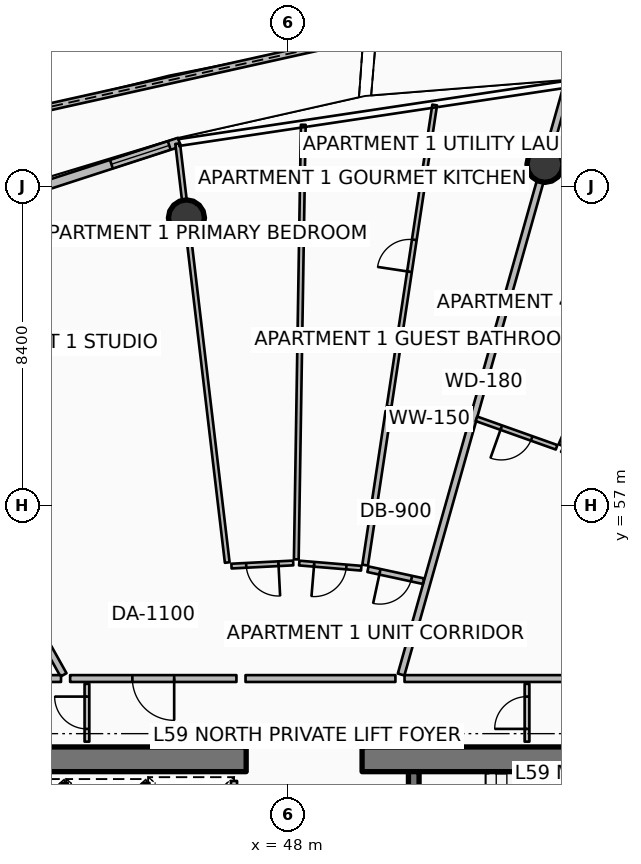
"""IFC4 building model, lengths in metres.
Left out: names, types, materials, properties, quantities, classifications, styles, units other than length and angle.
Written with IfcOpenShell. Run it as: python <this file> out.ifc"""

import sys

from ifc_helpers import new_model, si_unit, direction, frame, frame_2d, origin, origin_2d, place, context, subcontext, project, spatial, polyline, rectangle, circle, outline, extrude, element, fill, save


model = new_model("IFC4")
c1 = context("Model", 3, precision=1e-05, world=origin(), true_north=direction((0.0, 1.0)))
c2 = subcontext(c1, "Body", "Model", "MODEL_VIEW")
j1 = project(units=[si_unit("LENGTHUNIT", "METRE"), si_unit("PLANEANGLEUNIT", "RADIAN")], contexts=[c1])
p1 = place(None, origin())
s1 = spatial("IfcSite", under=j1, at=p1, CompositionType="ELEMENT")
p2 = place(p1, origin())
s2 = spatial("IfcBuilding", under=s1, at=p2, CompositionType="ELEMENT")
p3 = place(p2, frame((0.0, 0.0, 236.7)))
s3 = spatial("IfcBuildingStorey", under=s2, at=p3, CompositionType="ELEMENT", Elevation=236.7)
for number, where, z_axis, x_axis in (
    (1, (37.15, 50.325, 0.0), (0.0, 0.0, 1.0), (1.0, 0.0, 0.0)),
    (2, (49.95, 50.325, 0.0), (0.0, 0.0, 1.0), (1.0, 0.0, 0.0)),
):
    element("IfcWall", number, at=place(p3, frame(where, z_axis=z_axis, x_axis=x_axis)), inside=s3, PredefinedType="SHEAR", context=c2, shape_type="SweptSolid", body=[
        extrude(rectangle(XDim=9.75, YDim=0.65, at=frame_2d((4.875, 0.0))), origin(), (0.0, 0.0, 1.0), 3.85),
    ])
p4 = place(p3, frame((51.31, 46.5, 0.0), z_axis=(0.0, 0.0, 1.0), x_axis=(0.0, 1.0, 0.0)))
e3 = element("IfcWall", 3, at=p4, inside=s3, PredefinedType="SHEAR", context=c2, shape_type="SweptSolid", body=[
    extrude(rectangle(XDim=3.5, YDim=0.28, at=frame_2d((1.75, 0.0))), origin(), (0.0, 0.0, 1.0), 3.85),
])
for number, where, z_axis, x_axis in (
    (4, (54.763, 65.979, 0.0), (0.0, 0.0, 1.0), (1.0, 0.0, 0.0)),
    (5, (45.329, 64.571, 0.0), (0.0, 0.0, 1.0), (1.0, 0.0, 0.0)),
):
    element("IfcColumn", number, at=place(p3, frame(where, z_axis=z_axis, x_axis=x_axis)), inside=s3, PredefinedType="COLUMN", context=c2, shape_type="SweptSolid", body=[
        extrude(circle(Radius=0.475, at=origin_2d()), origin(), (0.0, 0.0, 1.0), 3.59),
    ])
p5 = place(p3, frame((49.983, 69.327, 0.0), z_axis=(0.0, 0.0, 1.0), x_axis=(-0.976130464401, -0.217184982143, 0.0)))
e6 = element("IfcWall", 6, at=p5, inside=s3, PredefinedType="PARAPET", context=c2, shape_type="SweptSolid", body=[
    extrude(outline(polyline([(0.0, 0.0), (10.258, 0.0), (10.257, 1.348), (5.129, 1.182), (0.0, 1.12), (0.0, 0.0)])), frame((0.0, 0.09, 0.0), z_axis=(0.0, -1.0, 0.0), x_axis=(1.0, 0.0, 0.0)), (0.0, 0.0, 1.0), 0.18),
])
p6 = place(p3, frame((45.142, 66.564, 0.0), z_axis=(0.0, 0.0, 1.0), x_axis=(-0.951055974609, -0.309018661507, 0.0)))
e7 = element("IfcWall", 7, at=p6, inside=s3, PredefinedType="SOLIDWALL", context=c2, shape_type="SweptSolid", body=[
    extrude(rectangle(XDim=9.745, YDim=0.24, at=frame_2d((4.873, 0.0))), origin(), (0.0, 0.0, 1.0), 2.54),
])
p7 = place(p6, frame((7.525, 0.0, 0.0)))
e8 = element("IfcOpeningElement", 8, at=p7, cuts=e7, PredefinedType="OPENING", context=c2, shape_type="SweptSolid", body=[
    extrude(rectangle(XDim=1.45, YDim=2.15, at=frame_2d((0.725, 1.075))), frame((0.0, 0.13, 0.0), z_axis=(0.0, -1.0, 0.0), x_axis=(1.0, 0.0, 0.0)), (0.0, 0.0, 1.0), 0.26),
])
p8 = place(p6, frame((0.28, 0.0, 0.65)))
e9 = element("IfcOpeningElement", 9, at=p8, cuts=e7, PredefinedType="OPENING", context=c2, shape_type="SweptSolid", body=[
    extrude(rectangle(XDim=1.6, YDim=1.5, at=frame_2d((0.8, 0.75))), frame((0.0, 0.13, 0.0), z_axis=(0.0, -1.0, 0.0), x_axis=(1.0, 0.0, 0.0)), (0.0, 0.0, 1.0), 0.26),
])
for number, where, z_axis, x_axis in (
    (10, (42.125, 48.095, 0.0), (0.0, 0.0, 1.0), (0.0, 1.0, 0.0)),
    (11, (44.275, 48.095, 0.0), (0.0, 0.0, 1.0), (0.0, 1.0, 0.0)),
):
    element("IfcWall", number, at=place(p3, frame(where, z_axis=z_axis, x_axis=x_axis)), inside=s3, PredefinedType="PARTITIONING", context=c2, shape_type="SweptSolid", body=[
        extrude(rectangle(XDim=1.61, YDim=0.16, at=frame_2d((0.805, 0.0))), origin(), (0.0, 0.0, 1.0), 3.59),
    ])
p9 = place(p3, frame((46.58, 48.045, 0.0), z_axis=(0.0, 0.0, 1.0), x_axis=(0.0, 1.0, 0.0)))
e12 = element("IfcWall", 12, at=p9, inside=s3, PredefinedType="PARTITIONING", context=c2, shape_type="SweptSolid", body=[
    extrude(rectangle(XDim=1.71, YDim=0.16, at=frame_2d((0.855, 0.0))), origin(), (0.0, 0.0, 1.0), 3.59),
])
p10 = place(p3, frame((42.71, 50.79, 0.0), z_axis=(0.0, 0.0, 1.0), x_axis=(0.0, 1.0, 0.0)))
e13 = element("IfcWall", 13, at=p10, inside=s3, PredefinedType="PARTITIONING", context=c2, shape_type="SweptSolid", body=[
    extrude(rectangle(XDim=1.52, YDim=0.125, at=frame_2d((0.76, 0.0))), origin(), (0.0, 0.0, 1.0), 2.957),
])
p11 = place(p10, frame((0.335, 0.0, 0.0)))
e14 = element("IfcOpeningElement", 14, at=p11, cuts=e13, PredefinedType="OPENING", context=c2, shape_type="SweptSolid", body=[
    extrude(rectangle(XDim=0.85, YDim=2.06, at=frame_2d((0.425, 1.03))), frame((0.0, 0.073, 0.0), z_axis=(0.0, -1.0, 0.0), x_axis=(1.0, 0.0, 0.0)), (0.0, 0.0, 1.0), 0.145),
])
p12 = place(p3, frame((54.29, 50.79, 0.0), z_axis=(0.0, 0.0, 1.0), x_axis=(0.0, 1.0, 0.0)))
e15 = element("IfcWall", 15, at=p12, inside=s3, PredefinedType="PARTITIONING", context=c2, shape_type="SweptSolid", body=[
    extrude(rectangle(XDim=1.52, YDim=0.125, at=frame_2d((0.76, 0.0))), origin(), (0.0, 0.0, 1.0), 3.03),
])
p13 = place(p12, frame((0.335, 0.0, 0.0)))
e16 = element("IfcOpeningElement", 16, at=p13, cuts=e15, PredefinedType="OPENING", context=c2, shape_type="SweptSolid", body=[
    extrude(rectangle(XDim=0.85, YDim=2.06, at=frame_2d((0.425, 1.03))), frame((0.0, 0.073, 0.0), z_axis=(0.0, -1.0, 0.0), x_axis=(1.0, 0.0, 0.0)), (0.0, 0.0, 1.0), 0.145),
])
p14 = place(p3, frame((50.977, 52.556, 0.0), z_axis=(0.0, 0.0, 1.0), x_axis=(0.271442063103, 0.962454781472, 0.0)))
e17 = element("IfcWall", 17, at=p14, inside=s3, PredefinedType="PARTITIONING", context=c2, shape_type="SweptSolid", body=[
    extrude(rectangle(XDim=16.017, YDim=0.18, at=frame_2d((8.008, 0.0))), origin(), (0.0, 0.0, 1.0), 2.957),
])
p15 = place(p3, frame((42.094, 52.546, 0.0), z_axis=(0.0, 0.0, 1.0), x_axis=(-0.48862654941, 0.872493034477, 0.0)))
e18 = element("IfcWall", 18, at=p15, inside=s3, PredefinedType="PARTITIONING", context=c2, shape_type="SweptSolid", body=[
    extrude(rectangle(XDim=12.508, YDim=0.18, at=frame_2d((6.254, 0.0))), origin(), (0.0, 0.0, 1.0), 2.957),
])
p16 = place(p3, frame((46.643, 52.45, 0.0), z_axis=(0.0, 0.0, 1.0), x_axis=(-1.0, 0.0, 0.0)))
e19 = element("IfcWall", 19, at=p16, inside=s3, PredefinedType="PARTITIONING", context=c2, shape_type="SweptSolid", body=[
    extrude(rectangle(XDim=4.376, YDim=0.18, at=frame_2d((2.188, 0.0))), origin(), (0.0, 0.0, 1.0), 2.957),
])
p17 = place(p16, frame((1.638, 0.0, 0.0)))
e20 = element("IfcOpeningElement", 20, at=p17, cuts=e19, PredefinedType="OPENING", context=c2, shape_type="SweptSolid", body=[
    extrude(rectangle(XDim=1.1, YDim=2.1, at=frame_2d((0.55, 1.05))), frame((0.0, 0.1, 0.0), z_axis=(0.0, -1.0, 0.0), x_axis=(1.0, 0.0, 0.0)), (0.0, 0.0, 1.0), 0.2),
])
p18 = place(p3, frame((50.827, 52.45, 0.0), z_axis=(0.0, 0.0, 1.0), x_axis=(-1.0, 0.0, 0.0)))
e21 = element("IfcWall", 21, at=p18, inside=s3, PredefinedType="PARTITIONING", context=c2, shape_type="SweptSolid", body=[
    extrude(rectangle(XDim=3.944, YDim=0.18, at=frame_2d((1.972, 0.0))), origin(), (0.0, 0.0, 1.0), 2.957),
])
p19 = place(p3, frame((46.402, 55.503, 0.0), z_axis=(0.0, 0.0, 1.0), x_axis=(-0.117541965763, 0.99306791625, 0.0)))
e22 = element("IfcWall", 22, at=p19, inside=s3, PredefinedType="PARTITIONING", context=c2, shape_type="SweptSolid", body=[
    extrude(rectangle(XDim=11.098, YDim=0.125, at=frame_2d((5.549, 0.0))), origin(), (0.0, 0.0, 1.0), 2.957),
])
p20 = place(p3, frame((51.566, 55.011, 0.0), z_axis=(0.0, 0.0, 1.0), x_axis=(-0.977543483976, 0.21073380587, 0.0)))
e23 = element("IfcWall", 23, at=p20, inside=s3, PredefinedType="PARTITIONING", context=c2, shape_type="SweptSolid", body=[
    extrude(rectangle(XDim=1.494, YDim=0.15, at=frame_2d((0.747, 0.0))), origin(), (0.0, 0.0, 1.0), 2.957),
])
p21 = place(p20, frame((0.322, 0.0, 0.0)))
e24 = element("IfcOpeningElement", 24, at=p21, cuts=e23, PredefinedType="OPENING", context=c2, shape_type="SweptSolid", body=[
    extrude(rectangle(XDim=0.85, YDim=2.06, at=frame_2d((0.425, 1.03))), frame((0.0, 0.085, 0.0), z_axis=(0.0, -1.0, 0.0), x_axis=(1.0, 0.0, 0.0)), (0.0, 0.0, 1.0), 0.17),
])
p22 = place(p3, frame((52.711, 59.073, 0.0), z_axis=(0.0, 0.0, 1.0), x_axis=(-0.977523973404, 0.210824290395, 0.0)))
e25 = element("IfcWall", 25, at=p22, inside=s3, PredefinedType="PARTITIONING", context=c2, shape_type="SweptSolid", body=[
    extrude(rectangle(XDim=2.021, YDim=0.15, at=frame_2d((1.01, 0.0))), origin(), (0.0, 0.0, 1.0), 2.957),
])
p23 = place(p3, frame((50.031, 55.434, 0.0), z_axis=(0.0, 0.0, 1.0), x_axis=(0.149464107942, 0.988767151779, 0.0)))
e26 = element("IfcWall", 26, at=p23, inside=s3, PredefinedType="PARTITIONING", context=c2, shape_type="SweptSolid", body=[
    extrude(rectangle(XDim=4.09, YDim=0.15, at=frame_2d((2.045, 0.0))), origin(), (0.0, 0.0, 1.0), 3.03),
])
p24 = place(p3, frame((50.661, 59.607, 0.0), z_axis=(0.0, 0.0, 1.0), x_axis=(0.149441267911, 0.988770604056, 0.0)))
e27 = element("IfcWall", 27, at=p24, inside=s3, PredefinedType="PARTITIONING", context=c2, shape_type="SweptSolid", body=[
    extrude(rectangle(XDim=8.025, YDim=0.125, at=frame_2d((4.012, 0.0))), origin(), (0.0, 0.0, 1.0), 3.03),
])
p25 = place(p24, frame((3.587, 0.0, 0.0)))
e28 = element("IfcOpeningElement", 28, at=p25, cuts=e27, PredefinedType="OPENING", context=c2, shape_type="SweptSolid", body=[
    extrude(rectangle(XDim=0.85, YDim=2.06, at=frame_2d((0.425, 1.03))), frame((0.0, 0.073, 0.0), z_axis=(0.0, -1.0, 0.0), x_axis=(1.0, 0.0, 0.0)), (0.0, 0.0, 1.0), 0.145),
])
p26 = place(p3, frame((48.219, 55.585, 0.0), z_axis=(0.0, 0.0, 1.0), x_axis=(0.016095267484, 0.999870462792, 0.0)))
e29 = element("IfcWall", 29, at=p26, inside=s3, PredefinedType="PARTITIONING", context=c2, shape_type="SweptSolid", body=[
    extrude(rectangle(XDim=11.437, YDim=0.125, at=frame_2d((5.719, 0.0))), origin(), (0.0, 0.0, 1.0), 3.03),
])
p27 = place(p3, frame((49.927, 55.353, 0.0), z_axis=(0.0, 0.0, 1.0), x_axis=(-0.996539580569, 0.083119578673, 0.0)))
e30 = element("IfcWall", 30, at=p27, inside=s3, PredefinedType="PARTITIONING", context=c2, shape_type="SweptSolid", body=[
    extrude(rectangle(XDim=1.636, YDim=0.125, at=frame_2d((0.818, 0.0))), origin(), (0.0, 0.0, 1.0), 3.03),
])
p28 = place(p27, frame((0.393, 0.0, 0.0)))
e31 = element("IfcOpeningElement", 31, at=p28, cuts=e30, PredefinedType="OPENING", context=c2, shape_type="SweptSolid", body=[
    extrude(rectangle(XDim=0.85, YDim=2.06, at=frame_2d((0.425, 1.03))), frame((0.0, 0.073, 0.0), z_axis=(0.0, -1.0, 0.0), x_axis=(1.0, 0.0, 0.0)), (0.0, 0.0, 1.0), 0.145),
])
p29 = place(p3, frame((48.137, 55.491, 0.0), z_axis=(0.0, 0.0, 1.0), x_axis=(-0.998703955292, -0.050896067475, 0.0)))
e32 = element("IfcWall", 32, at=p29, inside=s3, PredefinedType="PARTITIONING", context=c2, shape_type="SweptSolid", body=[
    extrude(rectangle(XDim=1.626, YDim=0.125, at=frame_2d((0.813, 0.0))), origin(), (0.0, 0.0, 1.0), 3.03),
])
p30 = place(p29, frame((0.388, 0.0, 0.0)))
e33 = element("IfcOpeningElement", 33, at=p30, cuts=e32, PredefinedType="OPENING", context=c2, shape_type="SweptSolid", body=[
    extrude(rectangle(XDim=0.85, YDim=2.06, at=frame_2d((0.425, 1.03))), frame((0.0, 0.073, 0.0), z_axis=(0.0, -1.0, 0.0), x_axis=(1.0, 0.0, 0.0)), (0.0, 0.0, 1.0), 0.145),
])
p31 = place(p3, frame((42.028, 52.45, 0.0), z_axis=(0.0, 0.0, 1.0), x_axis=(-1.0, 0.0, 0.0)))
e34 = element("IfcWall", 34, at=p31, inside=s3, PredefinedType="PARTITIONING", context=c2, shape_type="SweptSolid", body=[
    extrude(rectangle(XDim=4.758, YDim=0.18, at=frame_2d((2.379, 0.0))), origin(), (0.0, 0.0, 1.0), 2.957),
])
p32 = place(p3, frame((56.118, 52.45, 0.0), z_axis=(0.0, 0.0, 1.0), x_axis=(-1.0, 0.0, 0.0)))
e35 = element("IfcWall", 35, at=p32, inside=s3, PredefinedType="PARTITIONING", context=c2, shape_type="SweptSolid", body=[
    extrude(rectangle(XDim=5.051, YDim=0.18, at=frame_2d((2.525, 0.0))), origin(), (0.0, 0.0, 1.0), 2.957),
])
p33 = place(p3, frame((55.179, 58.59, 0.0), z_axis=(0.0, 0.0, 1.0), x_axis=(0.397155540024, 0.91775131546, 0.0)))
e36 = element("IfcWall", 36, at=p33, inside=s3, PredefinedType="PARTITIONING", context=c2, shape_type="SweptSolid", body=[
    extrude(rectangle(XDim=9.234, YDim=0.125, at=frame_2d((4.617, 0.0))), origin(), (0.0, 0.0, 1.0), 3.03),
])
p34 = place(p3, frame((57.206, 57.446, 0.0), z_axis=(0.0, 0.0, 1.0), x_axis=(-0.88917885275, 0.45755979699, 0.0)))
e37 = element("IfcWall", 37, at=p34, inside=s3, PredefinedType="PARTITIONING", context=c2, shape_type="SweptSolid", body=[
    extrude(rectangle(XDim=2.24, YDim=0.125, at=frame_2d((1.12, 0.0))), origin(), (0.0, 0.0, 1.0), 3.03),
])
p35 = place(p34, frame((0.695, 0.0, 0.0)))
e38 = element("IfcOpeningElement", 38, at=p35, cuts=e37, PredefinedType="OPENING", context=c2, shape_type="SweptSolid", body=[
    extrude(rectangle(XDim=0.85, YDim=2.06, at=frame_2d((0.425, 1.03))), frame((0.0, 0.073, 0.0), z_axis=(0.0, -1.0, 0.0), x_axis=(1.0, 0.0, 0.0)), (0.0, 0.0, 1.0), 0.145),
])
p36 = place(p3, frame((55.068, 58.534, 0.0), z_axis=(0.0, 0.0, 1.0), x_axis=(-0.942194809645, 0.335065576683, 0.0)))
e39 = element("IfcWall", 39, at=p36, inside=s3, PredefinedType="PARTITIONING", context=c2, shape_type="SweptSolid", body=[
    extrude(rectangle(XDim=2.24, YDim=0.125, at=frame_2d((1.12, 0.0))), origin(), (0.0, 0.0, 1.0), 2.957),
])
p37 = place(p36, frame((0.695, 0.0, 0.0)))
e40 = element("IfcOpeningElement", 40, at=p37, cuts=e39, PredefinedType="OPENING", context=c2, shape_type="SweptSolid", body=[
    extrude(rectangle(XDim=0.85, YDim=2.06, at=frame_2d((0.425, 1.03))), frame((0.0, 0.073, 0.0), z_axis=(0.0, -1.0, 0.0), x_axis=(1.0, 0.0, 0.0)), (0.0, 0.0, 1.0), 0.145),
])
p38 = place(p8, origin())
e41 = element("IfcWindow", 41, at=p38, inside=s3, PartitioningType="SINGLE_PANEL", PredefinedType="WINDOW", context=c2, shape_type="SweptSolid", body=[
    extrude(rectangle(XDim=1.6, YDim=1.5, at=frame_2d((0.8, 0.75))), frame((0.0, 0.03, 0.0), z_axis=(0.0, -1.0, 0.0), x_axis=(1.0, 0.0, 0.0)), (0.0, 0.0, 1.0), 0.06),
])
fill(e9, e41)
p39 = place(p11, origin())
e42 = element("IfcDoor", 42, at=p39, inside=s3, OperationType="SINGLE_SWING_RIGHT", PredefinedType="DOOR", context=c2, shape_type="SweptSolid", body=[
    extrude(rectangle(XDim=0.85, YDim=2.06, at=frame_2d((0.425, 1.03))), frame((0.0, 0.025, 0.0), z_axis=(0.0, -1.0, 0.0), x_axis=(1.0, 0.0, 0.0)), (0.0, 0.0, 1.0), 0.05),
])
fill(e14, e42)
p40 = place(p13, origin())
e43 = element("IfcDoor", 43, at=p40, inside=s3, OperationType="SINGLE_SWING_LEFT", PredefinedType="DOOR", context=c2, shape_type="SweptSolid", body=[
    extrude(rectangle(XDim=0.85, YDim=2.06, at=frame_2d((0.425, 1.03))), frame((0.0, 0.025, 0.0), z_axis=(0.0, -1.0, 0.0), x_axis=(1.0, 0.0, 0.0)), (0.0, 0.0, 1.0), 0.05),
])
fill(e16, e43)
p41 = place(p17, origin())
e44 = element("IfcDoor", 44, at=p41, inside=s3, OperationType="SINGLE_SWING_LEFT", PredefinedType="DOOR", context=c2, shape_type="SweptSolid", body=[
    extrude(rectangle(XDim=1.1, YDim=2.1, at=frame_2d((0.55, 1.05))), frame((0.0, 0.025, 0.0), z_axis=(0.0, -1.0, 0.0), x_axis=(1.0, 0.0, 0.0)), (0.0, 0.0, 1.0), 0.05),
])
fill(e20, e44)
p42 = place(p21, origin())
e45 = element("IfcDoor", 45, at=p42, inside=s3, OperationType="SINGLE_SWING_RIGHT", PredefinedType="DOOR", context=c2, shape_type="SweptSolid", body=[
    extrude(rectangle(XDim=0.85, YDim=2.06, at=frame_2d((0.425, 1.03))), frame((0.0, 0.025, 0.0), z_axis=(0.0, -1.0, 0.0), x_axis=(1.0, 0.0, 0.0)), (0.0, 0.0, 1.0), 0.05),
])
fill(e24, e45)
p43 = place(p25, origin())
e46 = element("IfcDoor", 46, at=p43, inside=s3, OperationType="SINGLE_SWING_LEFT", PredefinedType="DOOR", context=c2, shape_type="SweptSolid", body=[
    extrude(rectangle(XDim=0.85, YDim=2.06, at=frame_2d((0.425, 1.03))), frame((0.0, 0.025, 0.0), z_axis=(0.0, -1.0, 0.0), x_axis=(1.0, 0.0, 0.0)), (0.0, 0.0, 1.0), 0.05),
])
fill(e28, e46)
p44 = place(p28, origin())
e47 = element("IfcDoor", 47, at=p44, inside=s3, OperationType="SINGLE_SWING_RIGHT", PredefinedType="DOOR", context=c2, shape_type="SweptSolid", body=[
    extrude(rectangle(XDim=0.85, YDim=2.06, at=frame_2d((0.425, 1.03))), frame((0.0, 0.025, 0.0), z_axis=(0.0, -1.0, 0.0), x_axis=(1.0, 0.0, 0.0)), (0.0, 0.0, 1.0), 0.05),
])
fill(e31, e47)
p45 = place(p30, origin())
e48 = element("IfcDoor", 48, at=p45, inside=s3, OperationType="SINGLE_SWING_LEFT", PredefinedType="DOOR", context=c2, shape_type="SweptSolid", body=[
    extrude(rectangle(XDim=0.85, YDim=2.06, at=frame_2d((0.425, 1.03))), frame((0.0, 0.025, 0.0), z_axis=(0.0, -1.0, 0.0), x_axis=(1.0, 0.0, 0.0)), (0.0, 0.0, 1.0), 0.05),
])
fill(e33, e48)
p46 = place(p37, origin())
e49 = element("IfcDoor", 49, at=p46, inside=s3, OperationType="SINGLE_SWING_RIGHT", PredefinedType="DOOR", context=c2, shape_type="SweptSolid", body=[
    extrude(rectangle(XDim=0.85, YDim=2.06, at=frame_2d((0.425, 1.03))), frame((0.0, 0.025, 0.0), z_axis=(0.0, -1.0, 0.0), x_axis=(1.0, 0.0, 0.0)), (0.0, 0.0, 1.0), 0.05),
])
fill(e40, e49)
save(model, sys.argv[1])
